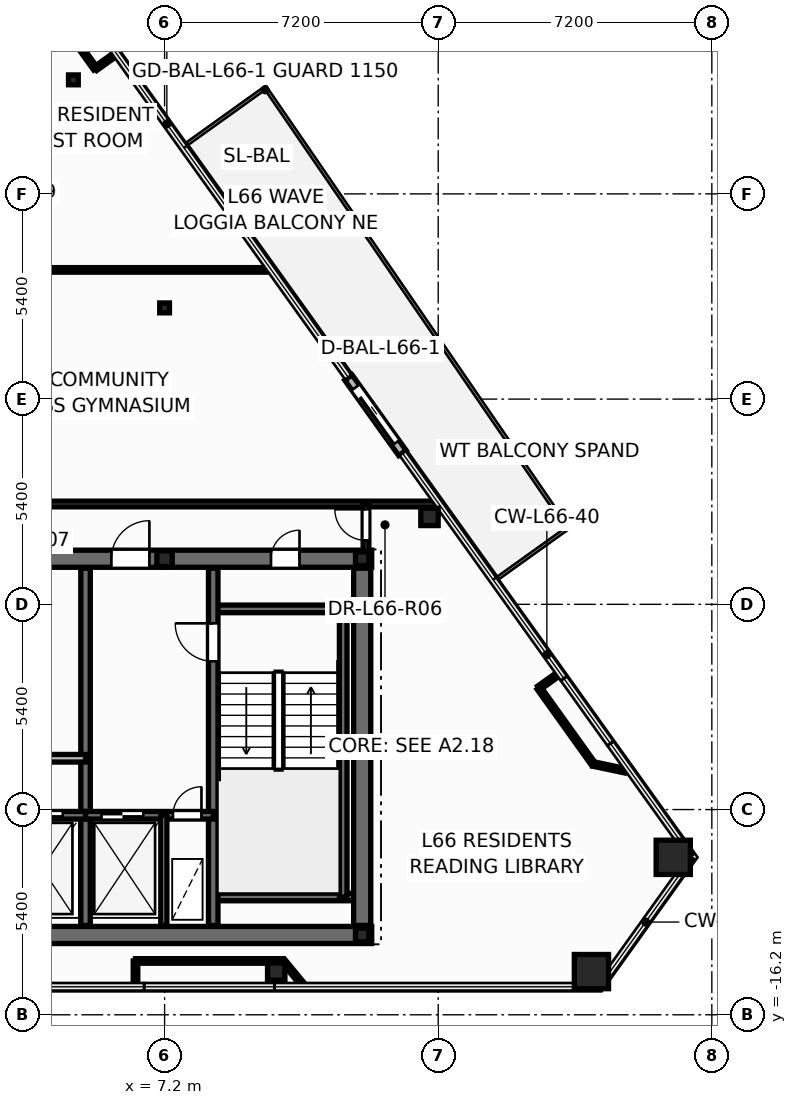
"""IFC4 building model, lengths in metres.
Left out: names, types, materials, properties, quantities, classifications, styles, units other than length and angle.
Written with IfcOpenShell. Run it as: python <this file> out.ifc"""

import sys

from ifc_helpers import new_model, si_unit, direction, frame, frame_2d, origin, origin_2d, place, context, subcontext, project, spatial, rectangle, hollow_rectangle, hollow_circle, i_section, extrude, element, fill, save


model = new_model("IFC4")
c1 = context("Model", 3, precision=1e-05, world=origin(), true_north=direction((0.0, 1.0)))
c2 = subcontext(c1, "Body", "Model", "MODEL_VIEW")
j1 = project(units=[si_unit("LENGTHUNIT", "METRE"), si_unit("PLANEANGLEUNIT", "RADIAN")], contexts=[c1])
p1 = place(None, origin())
s1 = spatial("IfcSite", under=j1, at=p1, CompositionType="ELEMENT")
p2 = place(p1, origin())
s2 = spatial("IfcBuilding", under=s1, at=p2, CompositionType="ELEMENT")
p3 = place(p2, frame((0.0, 0.0, 252.6)))
s3 = spatial("IfcBuildingStorey", under=s2, at=p3, CompositionType="ELEMENT", Elevation=252.6)
for number, where, z_axis, x_axis in (
    (1, (18.432, -15.063, 0.0), (0.0, 0.0, 1.0), (1.0, 0.0, 0.0)),
    (2, (20.585, -12.057, 0.0), (0.0, 0.0, 1.0), (1.0, 0.0, 0.0)),
):
    element("IfcColumn", number, at=place(p3, frame(where, z_axis=z_axis, x_axis=x_axis)), inside=s3, PredefinedType="COLUMN", context=c2, shape_type="SweptSolid", body=[
        extrude(hollow_rectangle(XDim=0.9, YDim=0.9, WallThickness=0.04, at=origin_2d()), origin(), (0.0, 0.0, 1.0), 3.6),
    ])
for number, where, z_axis, x_axis in (
    (3, (10.138, -15.063, 0.0), (0.0, 0.0, 1.0), (1.0, 0.0, 0.0)),
    (4, (14.171, -3.099, 0.0), (0.0, 0.0, 1.0), (1.0, 0.0, 0.0)),
    (5, (8.673, 4.579, 0.0), (0.0, 0.0, 1.0), (1.0, 0.0, 0.0)),
):
    element("IfcColumn", number, at=place(p3, frame(where, z_axis=z_axis, x_axis=x_axis)), inside=s3, PredefinedType="COLUMN", context=c2, shape_type="SweptSolid", body=[
        extrude(hollow_circle(Radius=0.229, WallThickness=0.016, at=origin_2d()), origin(), (0.0, 0.0, 1.0), 3.6),
    ])
for number, where, z_axis, x_axis in (
    (6, (12.4, -14.1, 0.0), (0.0, 0.0, 1.0), (1.0, 0.0, 0.0)),
    (7, (12.4, -4.2, 0.0), (0.0, 0.0, 1.0), (1.0, 0.0, 0.0)),
):
    element("IfcColumn", number, at=place(p3, frame(where, z_axis=z_axis, x_axis=x_axis)), inside=s3, PredefinedType="COLUMN", context=c2, shape_type="SweptSolid", body=[
        extrude(i_section(OverallWidth=0.352, OverallDepth=0.359, WebThickness=0.018, FlangeThickness=0.026, at=origin_2d()), origin(), (0.0, 0.0, 1.0), 3.6),
    ])
p4 = place(p3, frame((7.2, -4.2, 0.0), z_axis=(0.0, 0.0, 1.0), x_axis=(1.0, 0.0, 0.0)))
e8 = element("IfcColumn", 8, at=p4, inside=s3, PredefinedType="PILASTER", context=c2, shape_type="SweptSolid", body=[
    extrude(i_section(OverallWidth=0.405, OverallDepth=0.414, WebThickness=0.022, FlangeThickness=0.032, at=origin_2d()), origin(), (0.0, 0.0, 1.0), 3.6),
])
for number, where, z_axis, x_axis in (
    (9, (7.2, 2.4, 0.0), (0.0, 0.0, 1.0), (1.0, 0.0, 0.0)),
    (10, (4.8, 8.4, 0.0), (0.0, 0.0, 1.0), (1.0, 0.0, 0.0)),
):
    element("IfcColumn", number, at=place(p3, frame(where, z_axis=z_axis, x_axis=x_axis)), inside=s3, PredefinedType="COLUMN", context=c2, shape_type="SweptSolid", body=[
        extrude(i_section(OverallWidth=0.256, OverallDepth=0.26, WebThickness=0.01, FlangeThickness=0.017, at=origin_2d()), origin(), (0.0, 0.0, 1.0), 3.6),
    ])
p5 = place(p3, frame((13.458, -1.417, -0.015), z_axis=(0.0, 0.0, 1.0), x_axis=(-0.582146480264, 0.813083928949, 0.0)))
e11 = element("IfcWall", 11, at=p5, inside=s3, PredefinedType="STANDARD", context=c2, shape_type="SweptSolid", body=[
    extrude(rectangle(XDim=2.44, YDim=0.24, at=frame_2d((1.22, 0.0))), origin(), (0.0, 0.0, 1.0), 2.878),
])
p6 = place(p5, frame((0.32, 0.0, 0.015)))
e12 = element("IfcOpeningElement", 12, at=p6, cuts=e11, PredefinedType="OPENING", context=c2, shape_type="SweptSolid", body=[
    extrude(rectangle(XDim=1.806, YDim=2.204, at=frame_2d((0.9, 1.102))), frame((0.0, 0.13, 0.0), z_axis=(0.0, -1.0, 0.0), x_axis=(1.0, 0.0, 0.0)), (0.0, 0.0, 1.0), 0.26),
])
p7 = place(p3, frame((-12.65, -14.1, 0.0), z_axis=(0.0, 0.0, 1.0), x_axis=(1.0, 0.0, 0.0)))
e13 = element("IfcWall", 13, at=p7, inside=s3, PredefinedType="SHEAR", context=c2, shape_type="SweptSolid", body=[
    extrude(rectangle(XDim=25.3, YDim=0.45, at=frame_2d((12.65, 0.0))), origin(), (0.0, 0.0, 1.0), 3.6),
])
p8 = place(p3, frame((-12.65, -4.2, 0.0), z_axis=(0.0, 0.0, 1.0), x_axis=(1.0, 0.0, 0.0)))
e14 = element("IfcWall", 14, at=p8, inside=s3, PredefinedType="SHEAR", context=c2, shape_type="SweptSolid", body=[
    extrude(rectangle(XDim=25.3, YDim=0.45, at=frame_2d((12.65, 0.0))), origin(), (0.0, 0.0, 1.0), 3.6),
])
p9 = place(p8, frame((1.85, 0.0, 0.0)))
e15 = element("IfcOpeningElement", 15, at=p9, cuts=e14, PredefinedType="OPENING", context=c2, shape_type="SweptSolid", body=[
    extrude(rectangle(XDim=0.756, YDim=2.054, at=frame_2d((0.375, 1.027))), frame((0.0, 0.235, 0.0), z_axis=(0.0, -1.0, 0.0), x_axis=(1.0, 0.0, 0.0)), (0.0, 0.0, 1.0), 0.47),
])
p10 = place(p8, frame((22.65, 0.0, 0.0)))
e16 = element("IfcOpeningElement", 16, at=p10, cuts=e14, PredefinedType="OPENING", context=c2, shape_type="SweptSolid", body=[
    extrude(rectangle(XDim=0.756, YDim=2.054, at=frame_2d((0.375, 1.027))), frame((0.0, 0.235, 0.0), z_axis=(0.0, -1.0, 0.0), x_axis=(1.0, 0.0, 0.0)), (0.0, 0.0, 1.0), 0.47),
])
p11 = place(p8, frame((5.85, 0.0, 0.0)))
e17 = element("IfcOpeningElement", 17, at=p11, cuts=e14, PredefinedType="OPENING", context=c2, shape_type="SweptSolid", body=[
    extrude(rectangle(XDim=1.006, YDim=2.104, at=frame_2d((0.5, 1.052))), frame((0.0, 0.235, 0.0), z_axis=(0.0, -1.0, 0.0), x_axis=(1.0, 0.0, 0.0)), (0.0, 0.0, 1.0), 0.47),
])
p12 = place(p8, frame((10.35, 0.0, 0.0)))
e18 = element("IfcOpeningElement", 18, at=p12, cuts=e14, PredefinedType="OPENING", context=c2, shape_type="SweptSolid", body=[
    extrude(rectangle(XDim=1.406, YDim=2.154, at=frame_2d((0.7, 1.077))), frame((0.0, 0.235, 0.0), z_axis=(0.0, -1.0, 0.0), x_axis=(1.0, 0.0, 0.0)), (0.0, 0.0, 1.0), 0.47),
])
p13 = place(p8, frame((18.45, 0.0, 0.0)))
e19 = element("IfcOpeningElement", 19, at=p13, cuts=e14, PredefinedType="OPENING", context=c2, shape_type="SweptSolid", body=[
    extrude(rectangle(XDim=1.006, YDim=2.104, at=frame_2d((0.5, 1.052))), frame((0.0, 0.235, 0.0), z_axis=(0.0, -1.0, 0.0), x_axis=(1.0, 0.0, 0.0)), (0.0, 0.0, 1.0), 0.47),
])
for number, where, z_axis, x_axis in (
    (20, (8.48, -5.52, 0.0), (0.0, 0.0, 1.0), (1.0, 0.0, 0.0)),
    (21, (8.48, -13.1, 0.0), (0.0, 0.0, 1.0), (1.0, 0.0, 0.0)),
):
    element("IfcWall", number, at=place(p3, frame(where, z_axis=z_axis, x_axis=x_axis)), inside=s3, PredefinedType="SOLIDWALL", context=c2, shape_type="SweptSolid", body=[
        extrude(rectangle(XDim=3.87, YDim=0.2, at=frame_2d((1.935, 0.0))), origin(), (0.0, 0.0, 1.0), 3.6),
    ])
p14 = place(p3, frame((11.9, -13.1, 0.0), z_axis=(0.0, 0.0, 1.0), x_axis=(0.0, 1.0, 0.0)))
e22 = element("IfcWall", 22, at=p14, inside=s3, PredefinedType="SOLIDWALL", context=c2, shape_type="SweptSolid", body=[
    extrude(rectangle(XDim=7.58, YDim=0.2, at=frame_2d((3.79, 0.0))), origin(), (0.0, 0.0, 1.0), 3.6),
])
p15 = place(p3, frame((8.48, -13.85, 0.0), z_axis=(0.0, 0.0, 1.0), x_axis=(0.0, 1.0, 0.0)))
e23 = element("IfcWall", 23, at=p15, inside=s3, PredefinedType="SHEAR", context=c2, shape_type="SweptSolid", body=[
    extrude(rectangle(XDim=9.4, YDim=0.25, at=frame_2d((4.7, 0.0))), origin(), (0.0, 0.0, 1.0), 3.6),
])
p16 = place(p15, frame((6.95, 0.0, 0.0)))
e24 = element("IfcOpeningElement", 24, at=p16, cuts=e23, PredefinedType="OPENING", context=c2, shape_type="SweptSolid", body=[
    extrude(rectangle(XDim=1.006, YDim=2.104, at=frame_2d((0.5, 1.052))), frame((0.0, 0.135, 0.0), z_axis=(0.0, -1.0, 0.0), x_axis=(1.0, 0.0, 0.0)), (0.0, 0.0, 1.0), 0.27),
])
p17 = place(p3, frame((5.12, -13.85, 0.0), z_axis=(0.0, 0.0, 1.0), x_axis=(0.0, 1.0, 0.0)))
e25 = element("IfcWall", 25, at=p17, inside=s3, PredefinedType="SHEAR", context=c2, shape_type="SweptSolid", body=[
    extrude(rectangle(XDim=9.4, YDim=0.25, at=frame_2d((4.7, 0.0))), origin(), (0.0, 0.0, 1.0), 3.6),
])
p18 = place(p3, frame((-5.12, -10.95, 0.0), z_axis=(0.0, 0.0, 1.0), x_axis=(1.0, 0.0, 0.0)))
e26 = element("IfcWall", 26, at=p18, inside=s3, PredefinedType="SOLIDWALL", context=c2, shape_type="SweptSolid", body=[
    extrude(rectangle(XDim=10.24, YDim=0.2, at=frame_2d((5.12, 0.0))), origin(), (0.0, 0.0, 1.0), 3.6),
])
p19 = place(p18, frame((0.6, 0.0, 0.0)))
e27 = element("IfcOpeningElement", 27, at=p19, cuts=e26, PredefinedType="OPENING", context=c2, shape_type="SweptSolid", body=[
    extrude(rectangle(XDim=1.106, YDim=2.104, at=frame_2d((0.55, 1.052))), frame((0.0, 0.11, 0.0), z_axis=(0.0, -1.0, 0.0), x_axis=(1.0, 0.0, 0.0)), (0.0, 0.0, 1.0), 0.22),
])
p20 = place(p18, frame((2.67, 0.0, 0.0)))
e28 = element("IfcOpeningElement", 28, at=p20, cuts=e26, PredefinedType="OPENING", context=c2, shape_type="SweptSolid", body=[
    extrude(rectangle(XDim=1.106, YDim=2.104, at=frame_2d((0.55, 1.052))), frame((0.0, 0.11, 0.0), z_axis=(0.0, -1.0, 0.0), x_axis=(1.0, 0.0, 0.0)), (0.0, 0.0, 1.0), 0.22),
])
p21 = place(p18, frame((4.57, 0.0, 0.0)))
e29 = element("IfcOpeningElement", 29, at=p21, cuts=e26, PredefinedType="OPENING", context=c2, shape_type="SweptSolid", body=[
    extrude(rectangle(XDim=1.106, YDim=2.104, at=frame_2d((0.55, 1.052))), frame((0.0, 0.11, 0.0), z_axis=(0.0, -1.0, 0.0), x_axis=(1.0, 0.0, 0.0)), (0.0, 0.0, 1.0), 0.22),
])
p22 = place(p18, frame((6.47, 0.0, 0.0)))
e30 = element("IfcOpeningElement", 30, at=p22, cuts=e26, PredefinedType="OPENING", context=c2, shape_type="SweptSolid", body=[
    extrude(rectangle(XDim=1.106, YDim=2.104, at=frame_2d((0.55, 1.052))), frame((0.0, 0.11, 0.0), z_axis=(0.0, -1.0, 0.0), x_axis=(1.0, 0.0, 0.0)), (0.0, 0.0, 1.0), 0.22),
])
p23 = place(p18, frame((8.54, 0.0, 0.0)))
e31 = element("IfcOpeningElement", 31, at=p23, cuts=e26, PredefinedType="OPENING", context=c2, shape_type="SweptSolid", body=[
    extrude(rectangle(XDim=1.106, YDim=2.104, at=frame_2d((0.55, 1.052))), frame((0.0, 0.11, 0.0), z_axis=(0.0, -1.0, 0.0), x_axis=(1.0, 0.0, 0.0)), (0.0, 0.0, 1.0), 0.22),
])
p24 = place(p3, frame((5.12, -10.95, 0.0), z_axis=(0.0, 0.0, 1.0), x_axis=(1.0, 0.0, 0.0)))
e32 = element("IfcWall", 32, at=p24, inside=s3, PredefinedType="SOLIDWALL", context=c2, shape_type="SweptSolid", body=[
    extrude(rectangle(XDim=3.36, YDim=0.2, at=frame_2d((1.68, 0.0))), origin(), (0.0, 0.0, 1.0), 3.6),
])
p25 = place(p24, frame((0.42, 0.0, 0.0)))
e33 = element("IfcOpeningElement", 33, at=p25, cuts=e32, PredefinedType="OPENING", context=c2, shape_type="SweptSolid", body=[
    extrude(rectangle(XDim=1.106, YDim=2.104, at=frame_2d((0.55, 1.052))), frame((0.0, 0.11, 0.0), z_axis=(0.0, -1.0, 0.0), x_axis=(1.0, 0.0, 0.0)), (0.0, 0.0, 1.0), 0.22),
])
p26 = place(p24, frame((2.3, 0.0, 0.0)))
e34 = element("IfcOpeningElement", 34, at=p26, cuts=e32, PredefinedType="OPENING", context=c2, shape_type="SweptSolid", body=[
    extrude(rectangle(XDim=0.756, YDim=2.054, at=frame_2d((0.375, 1.027))), frame((0.0, 0.11, 0.0), z_axis=(0.0, -1.0, 0.0), x_axis=(1.0, 0.0, 0.0)), (0.0, 0.0, 1.0), 0.22),
])
p27 = place(p3, frame((7.18, -13.85, 0.0), z_axis=(0.0, 0.0, 1.0), x_axis=(0.0, 1.0, 0.0)))
e35 = element("IfcWall", 35, at=p27, inside=s3, PredefinedType="PARTITIONING", context=c2, shape_type="SweptSolid", body=[
    extrude(rectangle(XDim=2.9, YDim=0.16, at=frame_2d((1.45, 0.0))), origin(), (0.0, 0.0, 1.0), 2.57),
])
p28 = place(p3, frame((12.4, -13.85, 0.0), z_axis=(0.0, 0.0, 1.0), x_axis=(0.0, 1.0, 0.0)))
e36 = element("IfcWall", 36, at=p28, inside=s3, PredefinedType="SHEAR", context=c2, shape_type="SweptSolid", body=[
    extrude(rectangle(XDim=9.4, YDim=0.45, at=frame_2d((4.7, 0.0))), origin(), (0.0, 0.0, 1.0), 3.6),
])
p29 = place(p3, frame((2.88, -9.45, 0.0), z_axis=(0.0, 0.0, 1.0), x_axis=(1.0, 0.0, 0.0)))
e37 = element("IfcWall", 37, at=p29, inside=s3, PredefinedType="SOLIDWALL", context=c2, shape_type="SweptSolid", body=[
    extrude(rectangle(XDim=2.24, YDim=0.2, at=frame_2d((1.12, 0.0))), origin(), (0.0, 0.0, 1.0), 3.345),
])
p30 = place(p3, frame((2.36, -2.76, 0.0), z_axis=(0.0, 0.0, 1.0), x_axis=(1.0, 0.0, 0.0)))
e38 = element("IfcWall", 38, at=p30, inside=s3, PredefinedType="PARTITIONING", context=c2, shape_type="SweptSolid", body=[
    extrude(rectangle(XDim=12.06, YDim=0.15, at=frame_2d((6.03, 0.0))), origin(), (0.0, 0.0, 1.0), 2.32),
])
p31 = place(p30, frame((0.36, 0.0, 0.0)))
e39 = element("IfcOpeningElement", 39, at=p31, cuts=e38, PredefinedType="OPENING", context=c2, shape_type="SweptSolid", body=[
    extrude(rectangle(XDim=0.956, YDim=2.104, at=frame_2d((0.475, 1.052))), frame((0.0, 0.085, 0.0), z_axis=(0.0, -1.0, 0.0), x_axis=(1.0, 0.0, 0.0)), (0.0, 0.0, 1.0), 0.17),
])
p32 = place(p3, frame((2.36, 3.4, 0.0), z_axis=(0.0, 0.0, 1.0), x_axis=(1.0, 0.0, 0.0)))
e40 = element("IfcWall", 40, at=p32, inside=s3, PredefinedType="PARTITIONING", context=c2, shape_type="SweptSolid", body=[
    extrude(rectangle(XDim=7.649, YDim=0.12, at=frame_2d((3.824, 0.0))), origin(), (0.0, 0.0, 1.0), 2.718),
])
p33 = place(p3, frame((6.435, -14.783, 0.0), z_axis=(0.0, 0.0, 1.0), x_axis=(1.0, 0.0, 0.0)))
e41 = element("IfcWall", 41, at=p33, inside=s3, PredefinedType="PARTITIONING", context=c2, shape_type="SweptSolid", body=[
    extrude(rectangle(XDim=3.886, YDim=0.12, at=frame_2d((1.943, 0.0))), origin(), (0.0, 0.0, 1.0), 3.345),
])
p34 = place(p3, frame((5.381, 8.695, 0.0), z_axis=(0.0, 0.0, 1.0), x_axis=(-0.582269881882, 0.812995562505, 0.0)))
e42 = element("IfcWall", 42, at=p34, inside=s3, PredefinedType="PARTITIONING", context=c2, shape_type="SweptSolid", body=[
    extrude(rectangle(XDim=2.461, YDim=0.12, at=frame_2d((1.23, 0.0))), origin(), (0.0, 0.0, 1.0), 3.345),
])
p35 = place(p3, frame((18.483, -9.602, 0.0), z_axis=(0.0, 0.0, 1.0), x_axis=(-0.582222927872, 0.813029189058, 0.0)))
e43 = element("IfcWall", 43, at=p35, inside=s3, PredefinedType="PARTITIONING", context=c2, shape_type="SweptSolid", body=[
    extrude(rectangle(XDim=2.461, YDim=0.12, at=frame_2d((1.231, 0.0))), origin(), (0.0, 0.0, 1.0), 3.345),
])
p36 = place(p3, frame((12.5, -4.24, 0.0), z_axis=(0.0, 0.0, 1.0), x_axis=(0.0, 1.0, 0.0)))
e44 = element("IfcWall", 44, at=p36, inside=s3, PredefinedType="PARTITIONING", context=c2, shape_type="SweptSolid", body=[
    extrude(rectangle(XDim=1.48, YDim=0.15, at=frame_2d((0.74, 0.0))), origin(), (0.0, 0.0, 1.0), 2.32),
])
p37 = place(p36, frame((0.522, 0.0, 0.0)))
e45 = element("IfcOpeningElement", 45, at=p37, cuts=e44, PredefinedType="OPENING", context=c2, shape_type="SweptSolid", body=[
    extrude(rectangle(XDim=0.826, YDim=2.104, at=frame_2d((0.41, 1.052))), frame((0.0, 0.085, 0.0), z_axis=(0.0, -1.0, 0.0), x_axis=(1.0, 0.0, 0.0)), (0.0, 0.0, 1.0), 0.17),
])
p38 = place(p3, frame((10.321, -14.783, 0.0), z_axis=(0.0, 0.0, 1.0), x_axis=(0.636111126851, -0.771597456123, 0.0)))
e46 = element("IfcWall", 46, at=p38, inside=s3, PredefinedType="PARTITIONING", context=c2, shape_type="SweptSolid", body=[
    extrude(rectangle(XDim=0.869, YDim=0.12, at=frame_2d((0.434, 0.0))), origin(), (0.0, 0.0, 1.0), 2.863),
])
p39 = place(p3, frame((19.315, -9.777, 0.0), z_axis=(0.0, 0.0, 1.0), x_axis=(-0.978473583793, 0.206372105235, 0.0)))
e47 = element("IfcWall", 47, at=p39, inside=s3, PredefinedType="PARTITIONING", context=c2, shape_type="SweptSolid", body=[
    extrude(rectangle(XDim=0.851, YDim=0.12, at=frame_2d((0.425, 0.0))), origin(), (0.0, 0.0, 1.0), 2.863),
])
p40 = place(p3, frame((17.05, -7.601, 0.0), z_axis=(0.0, 0.0, 1.0), x_axis=(0.813142011208, 0.582065348229, 0.0)))
e48 = element("IfcWall", 48, at=p40, inside=s3, PredefinedType="PARTITIONING", context=c2, shape_type="SweptSolid", body=[
    extrude(rectangle(XDim=0.67, YDim=0.12, at=frame_2d((0.335, 0.0))), origin(), (0.0, 0.0, 1.0), 2.863),
])
p41 = place(p3, frame((6.435, -15.453, 0.0), z_axis=(0.0, 0.0, 1.0), x_axis=(0.0, 1.0, 0.0)))
e49 = element("IfcWall", 49, at=p41, inside=s3, PredefinedType="PARTITIONING", context=c2, shape_type="SweptSolid", body=[
    extrude(rectangle(XDim=0.67, YDim=0.12, at=frame_2d((0.335, 0.0))), origin(), (0.0, 0.0, 1.0), 2.863),
])
p42 = place(p3, frame((5.925, 9.085, 0.0), z_axis=(0.0, 0.0, 1.0), x_axis=(-0.812969505803, -0.582306261888, 0.0)))
e50 = element("IfcWall", 50, at=p42, inside=s3, PredefinedType="PARTITIONING", context=c2, shape_type="SweptSolid", body=[
    extrude(rectangle(XDim=0.67, YDim=0.12, at=frame_2d((0.335, 0.0))), origin(), (0.0, 0.0, 1.0), 2.863),
])
p43 = place(p6, origin())
e51 = element("IfcDoor", 51, at=p43, inside=s3, OperationType="SLIDING_TO_LEFT", PredefinedType="DOOR", context=c2, shape_type="SweptSolid", body=[
    extrude(rectangle(XDim=1.8, YDim=2.2, at=frame_2d((0.9, 1.1))), frame((0.0, 0.025, 0.0), z_axis=(0.0, -1.0, 0.0), x_axis=(1.0, 0.0, 0.0)), (0.0, 0.0, 1.0), 0.05),
])
fill(e12, e51)
p44 = place(p16, origin())
e52 = element("IfcDoor", 52, at=p44, inside=s3, OperationType="SINGLE_SWING_RIGHT", PredefinedType="DOOR", context=c2, shape_type="SweptSolid", body=[
    extrude(rectangle(XDim=1.0, YDim=2.1, at=frame_2d((0.5, 1.05))), frame((0.0, 0.025, 0.0), z_axis=(0.0, -1.0, 0.0), x_axis=(1.0, 0.0, 0.0)), (0.0, 0.0, 1.0), 0.05),
])
fill(e24, e52)
p45 = place(p25, origin())
e53 = element("IfcDoor", 53, at=p45, inside=s3, OperationType="DOUBLE_DOOR_SLIDING", PredefinedType="DOOR", context=c2, shape_type="SweptSolid", body=[
    extrude(rectangle(XDim=1.1, YDim=2.1, at=frame_2d((0.55, 1.05))), frame((0.0, 0.025, 0.0), z_axis=(0.0, -1.0, 0.0), x_axis=(1.0, 0.0, 0.0)), (0.0, 0.0, 1.0), 0.05),
])
fill(e33, e53)
p46 = place(p26, origin())
e54 = element("IfcDoor", 54, at=p46, inside=s3, OperationType="SINGLE_SWING_RIGHT", PredefinedType="DOOR", context=c2, shape_type="SweptSolid", body=[
    extrude(rectangle(XDim=0.75, YDim=2.05, at=frame_2d((0.375, 1.025))), frame((0.0, 0.025, 0.0), z_axis=(0.0, -1.0, 0.0), x_axis=(1.0, 0.0, 0.0)), (0.0, 0.0, 1.0), 0.05),
])
fill(e34, e54)
p47 = place(p23, origin())
e55 = element("IfcDoor", 55, at=p47, inside=s3, OperationType="DOUBLE_DOOR_SLIDING", PredefinedType="DOOR", context=c2, shape_type="SweptSolid", body=[
    extrude(rectangle(XDim=1.1, YDim=2.1, at=frame_2d((0.55, 1.05))), frame((0.0, 0.025, 0.0), z_axis=(0.0, -1.0, 0.0), x_axis=(1.0, 0.0, 0.0)), (0.0, 0.0, 1.0), 0.05),
])
fill(e31, e55)
p48 = place(p10, origin())
e56 = element("IfcDoor", 56, at=p48, inside=s3, OperationType="SINGLE_SWING_RIGHT", PredefinedType="DOOR", context=c2, shape_type="SweptSolid", body=[
    extrude(rectangle(XDim=0.75, YDim=2.05, at=frame_2d((0.375, 1.025))), frame((0.0, 0.025, 0.0), z_axis=(0.0, -1.0, 0.0), x_axis=(1.0, 0.0, 0.0)), (0.0, 0.0, 1.0), 0.05),
])
fill(e16, e56)
p49 = place(p13, origin())
e57 = element("IfcDoor", 57, at=p49, inside=s3, OperationType="SINGLE_SWING_RIGHT", PredefinedType="DOOR", context=c2, shape_type="SweptSolid", body=[
    extrude(rectangle(XDim=1.0, YDim=2.1, at=frame_2d((0.5, 1.05))), frame((0.0, 0.025, 0.0), z_axis=(0.0, -1.0, 0.0), x_axis=(1.0, 0.0, 0.0)), (0.0, 0.0, 1.0), 0.05),
])
fill(e19, e57)
p50 = place(p37, origin())
e58 = element("IfcDoor", 58, at=p50, inside=s3, OperationType="SINGLE_SWING_RIGHT", PredefinedType="DOOR", context=c2, shape_type="SweptSolid", body=[
    extrude(rectangle(XDim=0.82, YDim=2.1, at=frame_2d((0.41, 1.05))), frame((0.0, 0.025, 0.0), z_axis=(0.0, -1.0, 0.0), x_axis=(1.0, 0.0, 0.0)), (0.0, 0.0, 1.0), 0.05),
])
fill(e45, e58)
save(model, sys.argv[1])
